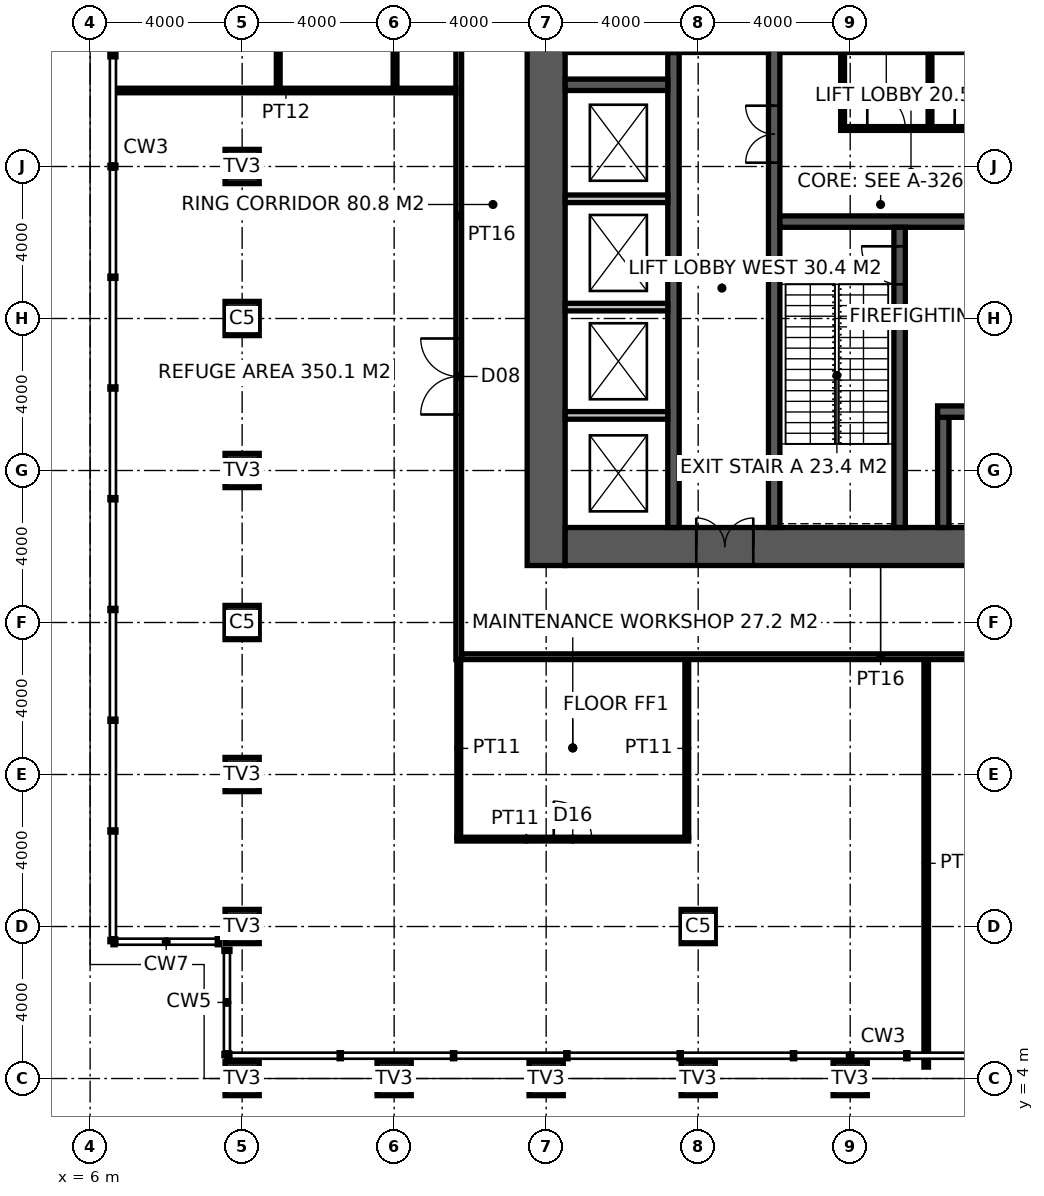
"""IFC4 building model, lengths in metres.
Left out: names, types, materials, properties, quantities, classifications, styles, units other than length and angle.
Written with IfcOpenShell. Run it as: python <this file> out.ifc"""

import sys

from ifc_helpers import new_model, si_unit, direction, frame, frame_2d, origin, origin_2d, place, context, subcontext, project, spatial, rectangle, hollow_rectangle, extrude, element, fill, save


model = new_model("IFC4")
c1 = context("Model", 3, precision=1e-05, world=origin(), true_north=direction((0.0, 1.0)))
c2 = subcontext(c1, "Body", "Model", "MODEL_VIEW")
j1 = project(units=[si_unit("LENGTHUNIT", "METRE"), si_unit("PLANEANGLEUNIT", "RADIAN")], contexts=[c1])
p1 = place(None, origin())
s1 = spatial("IfcSite", under=j1, at=p1, CompositionType="ELEMENT")
p2 = place(p1, origin())
s2 = spatial("IfcBuilding", under=s1, at=p2, CompositionType="ELEMENT")
p3 = place(p2, frame((0.0, 0.0, 137.4)))
s3 = spatial("IfcBuildingStorey", under=s2, at=p3, CompositionType="ELEMENT", Elevation=137.4)
for number, where, z_axis, x_axis in (
    (1, (10.0, 4.0, 0.0), (0.0, 0.0, 1.0), (1.0, 0.0, 0.0)),
    (2, (14.0, 4.0, 0.0), (0.0, 0.0, 1.0), (1.0, 0.0, 0.0)),
    (3, (18.0, 4.0, 0.0), (0.0, 0.0, 1.0), (1.0, 0.0, 0.0)),
    (4, (22.0, 4.0, 0.0), (0.0, 0.0, 1.0), (1.0, 0.0, 0.0)),
    (5, (26.0, 4.0, 0.0), (0.0, 0.0, 1.0), (1.0, 0.0, 0.0)),
    (6, (10.0, 8.0, 0.0), (0.0, 0.0, 1.0), (1.0, 0.0, 0.0)),
    (7, (10.0, 12.0, 0.0), (0.0, 0.0, 1.0), (1.0, 0.0, 0.0)),
    (8, (10.0, 20.0, 0.0), (0.0, 0.0, 1.0), (1.0, 0.0, 0.0)),
    (9, (10.0, 28.0, 0.0), (0.0, 0.0, 1.0), (1.0, 0.0, 0.0)),
):
    element("IfcColumn", number, at=place(p3, frame(where, z_axis=z_axis, x_axis=x_axis)), inside=s3, PredefinedType="USERDEFINED", context=c2, shape_type="SweptSolid", body=[
        extrude(hollow_rectangle(XDim=0.9, YDim=0.9, WallThickness=0.08, at=origin_2d()), origin(), (0.0, 0.0, 1.0), 5.4),
    ])
for number, where, z_axis, x_axis in (
    (10, (10.0, 16.0, 0.0), (0.0, 0.0, 1.0), (1.0, 0.0, 0.0)),
    (11, (10.0, 24.0, 0.0), (0.0, 0.0, 1.0), (1.0, 0.0, 0.0)),
    (12, (22.0, 8.0, 0.0), (0.0, 0.0, 1.0), (1.0, 0.0, 0.0)),
):
    element("IfcColumn", number, at=place(p3, frame(where, z_axis=z_axis, x_axis=x_axis)), inside=s3, PredefinedType="COLUMN", context=c2, shape_type="SweptSolid", body=[
        extrude(hollow_rectangle(XDim=0.9, YDim=0.9, WallThickness=0.1, at=origin_2d()), origin(), (0.0, 0.0, 1.0), 5.4),
    ])
p4 = place(p3, frame((18.0, 17.5, -0.15), z_axis=(0.0, 0.0, 1.0), x_axis=(0.0, 1.0, 0.0)))
e13 = element("IfcWall", 13, at=p4, inside=s3, PredefinedType="SHEAR", context=c2, shape_type="SweptSolid", body=[
    extrude(rectangle(XDim=19.0, YDim=1.0, at=frame_2d((9.5, 0.0))), origin(), (0.0, 0.0, 1.0), 5.4),
])
p5 = place(p3, frame((18.5, 18.0, -0.15), z_axis=(0.0, 0.0, 1.0), x_axis=(1.0, 0.0, 0.0)))
e14 = element("IfcWall", 14, at=p5, inside=s3, PredefinedType="SHEAR", context=c2, shape_type="SweptSolid", body=[
    extrude(rectangle(XDim=17.6, YDim=1.0, at=frame_2d((8.8, 0.0))), origin(), (0.0, 0.0, 1.0), 5.4),
])
p6 = place(p5, frame((3.45, 0.0, 0.15)))
e15 = element("IfcOpeningElement", 15, at=p6, cuts=e14, PredefinedType="OPENING", context=c2, shape_type="SweptSolid", body=[
    extrude(rectangle(XDim=1.5, YDim=2.4, at=frame_2d((0.75, 1.2))), frame((0.0, 0.51, 0.0), z_axis=(0.0, -1.0, 0.0), x_axis=(1.0, 0.0, 0.0)), (0.0, 0.0, 1.0), 1.02),
])
p7 = place(p3, frame((24.0, 18.5, -0.15), z_axis=(0.0, 0.0, 1.0), x_axis=(0.0, 1.0, 0.0)))
e16 = element("IfcWall", 16, at=p7, inside=s3, PredefinedType="SHEAR", context=c2, shape_type="SweptSolid", body=[
    extrude(rectangle(XDim=17.0, YDim=0.3, at=frame_2d((8.5, 0.0))), origin(), (0.0, 0.0, 1.0), 5.4),
])
p8 = place(p7, frame((9.6, 0.0, 0.15)))
e17 = element("IfcOpeningElement", 17, at=p8, cuts=e16, PredefinedType="OPENING", context=c2, shape_type="SweptSolid", body=[
    extrude(rectangle(XDim=1.5, YDim=2.4, at=frame_2d((0.75, 1.2))), frame((0.0, 0.16, 0.0), z_axis=(0.0, -1.0, 0.0), x_axis=(1.0, 0.0, 0.0)), (0.0, 0.0, 1.0), 0.32),
])
p9 = place(p3, frame((24.15, 26.55, -0.15), z_axis=(0.0, 0.0, 1.0), x_axis=(1.0, 0.0, 0.0)))
e18 = element("IfcWall", 18, at=p9, inside=s3, PredefinedType="SHEAR", context=c2, shape_type="SweptSolid", body=[
    extrude(rectangle(XDim=11.25, YDim=0.3, at=frame_2d((5.625, 0.0))), origin(), (0.0, 0.0, 1.0), 5.4),
])
p10 = place(p9, frame((9.25, 0.0, 0.15)))
e19 = element("IfcOpeningElement", 19, at=p10, cuts=e18, PredefinedType="OPENING", context=c2, shape_type="SweptSolid", body=[
    extrude(rectangle(XDim=1.0, YDim=2.2, at=frame_2d((0.5, 1.1))), frame((0.0, 0.16, 0.0), z_axis=(0.0, -1.0, 0.0), x_axis=(1.0, 0.0, 0.0)), (0.0, 0.0, 1.0), 0.32),
])
p11 = place(p9, frame((4.9, 0.0, 0.15)))
e20 = element("IfcOpeningElement", 20, at=p11, cuts=e18, PredefinedType="OPENING", context=c2, shape_type="SweptSolid", body=[
    extrude(rectangle(XDim=1.5, YDim=2.4, at=frame_2d((0.75, 1.2))), frame((0.0, 0.16, 0.0), z_axis=(0.0, -1.0, 0.0), x_axis=(1.0, 0.0, 0.0)), (0.0, 0.0, 1.0), 0.32),
])
p12 = place(p3, frame((27.3, 18.5, -0.15), z_axis=(0.0, 0.0, 1.0), x_axis=(0.0, 1.0, 0.0)))
e21 = element("IfcWall", 21, at=p12, inside=s3, PredefinedType="SHEAR", context=c2, shape_type="SweptSolid", body=[
    extrude(rectangle(XDim=7.9, YDim=0.3, at=frame_2d((3.95, 0.0))), origin(), (0.0, 0.0, 1.0), 5.4),
])
p13 = place(p12, frame((6.4, 0.0, 0.15)))
e22 = element("IfcOpeningElement", 22, at=p13, cuts=e21, PredefinedType="OPENING", context=c2, shape_type="SweptSolid", body=[
    extrude(rectangle(XDim=1.0, YDim=2.2, at=frame_2d((0.5, 1.1))), frame((0.0, 0.16, 0.0), z_axis=(0.0, -1.0, 0.0), x_axis=(1.0, 0.0, 0.0)), (0.0, 0.0, 1.0), 0.32),
])
p14 = place(p3, frame((28.45, 18.5, -0.15), z_axis=(0.0, 0.0, 1.0), x_axis=(0.0, 1.0, 0.0)))
e23 = element("IfcWall", 23, at=p14, inside=s3, PredefinedType="SHEAR", context=c2, shape_type="SweptSolid", body=[
    extrude(rectangle(XDim=2.9, YDim=0.3, at=frame_2d((1.45, 0.0))), origin(), (0.0, 0.0, 1.0), 5.4),
])
p15 = place(p3, frame((28.3, 21.55, -0.15), z_axis=(0.0, 0.0, 1.0), x_axis=(1.0, 0.0, 0.0)))
e24 = element("IfcWall", 24, at=p15, inside=s3, PredefinedType="SHEAR", context=c2, shape_type="SweptSolid", body=[
    extrude(rectangle(XDim=3.8, YDim=0.3, at=frame_2d((1.9, 0.0))), origin(), (0.0, 0.0, 1.0), 5.4),
])
p16 = place(p15, frame((1.05, 0.0, 0.15)))
e25 = element("IfcOpeningElement", 25, at=p16, cuts=e24, PredefinedType="OPENING", context=c2, shape_type="SweptSolid", body=[
    extrude(rectangle(XDim=1.3, YDim=2.4, at=frame_2d((0.65, 1.2))), frame((0.0, 0.16, 0.0), z_axis=(0.0, -1.0, 0.0), x_axis=(1.0, 0.0, 0.0)), (0.0, 0.0, 1.0), 0.32),
])
p17 = place(p3, frame((21.35, 18.5, -0.15), z_axis=(0.0, 0.0, 1.0), x_axis=(0.0, 1.0, 0.0)))
e26 = element("IfcWall", 26, at=p17, inside=s3, PredefinedType="SHEAR", context=c2, shape_type="SweptSolid", body=[
    extrude(rectangle(XDim=12.5, YDim=0.3, at=frame_2d((6.25, 0.0))), origin(), (0.0, 0.0, 1.0), 5.4),
])
p18 = place(p3, frame((18.5, 30.15, -0.15), z_axis=(0.0, 0.0, 1.0), x_axis=(1.0, 0.0, 0.0)))
e27 = element("IfcWall", 27, at=p18, inside=s3, PredefinedType="SHEAR", context=c2, shape_type="SweptSolid", body=[
    extrude(rectangle(XDim=2.7, YDim=0.3, at=frame_2d((1.35, 0.0))), origin(), (0.0, 0.0, 1.0), 5.4),
])
for number, where, z_axis, x_axis in (
    (28, (18.5, 21.45, 0.0), (0.0, 0.0, 1.0), (1.0, 0.0, 0.0)),
    (29, (18.5, 24.3, 0.0), (0.0, 0.0, 1.0), (1.0, 0.0, 0.0)),
    (30, (18.5, 27.15, 0.0), (0.0, 0.0, 1.0), (1.0, 0.0, 0.0)),
):
    element("IfcWall", number, at=place(p3, frame(where, z_axis=z_axis, x_axis=x_axis)), inside=s3, PredefinedType="SOLIDWALL", context=c2, shape_type="SweptSolid", body=[
        extrude(rectangle(XDim=2.7, YDim=0.2, at=frame_2d((1.35, 0.0))), origin(), (0.0, 0.0, 1.0), 5.25),
    ])
p19 = place(p3, frame((25.75, 29.0, 0.0), z_axis=(0.0, 0.0, 1.0), x_axis=(1.0, 0.0, 0.0)))
e31 = element("IfcWall", 31, at=p19, inside=s3, PredefinedType="PARTITIONING", context=c2, shape_type="SweptSolid", body=[
    extrude(rectangle(XDim=4.7, YDim=0.1, at=frame_2d((2.35, 0.0))), origin(), (0.0, 0.0, 1.0), 5.25),
])
p20 = place(p19, frame((0.7, 0.0, 0.0)))
e32 = element("IfcOpeningElement", 32, at=p20, cuts=e31, PredefinedType="OPENING", context=c2, shape_type="SweptSolid", body=[
    extrude(rectangle(XDim=1.0, YDim=2.2, at=frame_2d((0.5, 1.1))), frame((0.0, 0.06, 0.0), z_axis=(0.0, -1.0, 0.0), x_axis=(1.0, 0.0, 0.0)), (0.0, 0.0, 1.0), 0.12),
])
p21 = place(p19, frame((3.0, 0.0, 0.0)))
e33 = element("IfcOpeningElement", 33, at=p21, cuts=e31, PredefinedType="OPENING", context=c2, shape_type="SweptSolid", body=[
    extrude(rectangle(XDim=1.0, YDim=2.2, at=frame_2d((0.5, 1.1))), frame((0.0, 0.06, 0.0), z_axis=(0.0, -1.0, 0.0), x_axis=(1.0, 0.0, 0.0)), (0.0, 0.0, 1.0), 0.12),
])
for number, where, z_axis, x_axis in (
    (34, (25.8, 29.05, 0.0), (0.0, 0.0, 1.0), (0.0, 1.0, 0.0)),
    (35, (28.1, 29.05, 0.0), (0.0, 0.0, 1.0), (0.0, 1.0, 0.0)),
):
    element("IfcWall", number, at=place(p3, frame(where, z_axis=z_axis, x_axis=x_axis)), inside=s3, PredefinedType="PARTITIONING", context=c2, shape_type="SweptSolid", body=[
        extrude(rectangle(XDim=1.95, YDim=0.1, at=frame_2d((0.975, 0.0))), origin(), (0.0, 0.0, 1.0), 5.25),
    ])
p22 = place(p3, frame((15.7, 15.025, 0.0), z_axis=(0.0, 0.0, 1.0), x_axis=(0.0, 1.0, 0.0)))
e36 = element("IfcWall", 36, at=p22, inside=s3, PredefinedType="PARTITIONING", context=c2, shape_type="SweptSolid", body=[
    extrude(rectangle(XDim=23.35, YDim=0.15, at=frame_2d((11.675, 0.0))), origin(), (0.0, 0.0, 1.0), 5.25),
])
p23 = place(p22, frame((6.449, 0.0, 0.0)))
e37 = element("IfcOpeningElement", 37, at=p23, cuts=e36, PredefinedType="OPENING", context=c2, shape_type="SweptSolid", body=[
    extrude(rectangle(XDim=2.0, YDim=2.4, at=frame_2d((1.0, 1.2))), frame((0.0, 0.085, 0.0), z_axis=(0.0, -1.0, 0.0), x_axis=(1.0, 0.0, 0.0)), (0.0, 0.0, 1.0), 0.17),
])
p24 = place(p22, frame((17.601, 0.0, 0.0)))
e38 = element("IfcOpeningElement", 38, at=p24, cuts=e36, PredefinedType="OPENING", context=c2, shape_type="SweptSolid", body=[
    extrude(rectangle(XDim=3.0, YDim=3.3, at=frame_2d((1.5, 1.65))), frame((0.0, 0.085, 0.0), z_axis=(0.0, -1.0, 0.0), x_axis=(1.0, 0.0, 0.0)), (0.0, 0.0, 1.0), 0.17),
])
p25 = place(p3, frame((15.775, 15.1, 0.0), z_axis=(0.0, 0.0, 1.0), x_axis=(1.0, 0.0, 0.0)))
e39 = element("IfcWall", 39, at=p25, inside=s3, PredefinedType="PARTITIONING", context=c2, shape_type="SweptSolid", body=[
    extrude(rectangle(XDim=22.05, YDim=0.15, at=frame_2d((11.025, 0.0))), origin(), (0.0, 0.0, 1.0), 5.25),
])
p26 = place(p3, frame((28.0, 4.3, 0.0), z_axis=(0.0, 0.0, 1.0), x_axis=(0.0, 1.0, 0.0)))
e40 = element("IfcWall", 40, at=p26, inside=s3, PredefinedType="PARTITIONING", context=c2, shape_type="SweptSolid", body=[
    extrude(rectangle(XDim=10.725, YDim=0.12, at=frame_2d((5.362, 0.0))), origin(), (0.0, 0.0, 1.0), 5.25),
])
p27 = place(p3, frame((6.68, 30.0, 0.0), z_axis=(0.0, 0.0, 1.0), x_axis=(1.0, 0.0, 0.0)))
e41 = element("IfcWall", 41, at=p27, inside=s3, PredefinedType="PARTITIONING", context=c2, shape_type="SweptSolid", body=[
    extrude(rectangle(XDim=8.945, YDim=0.12, at=frame_2d((4.473, 0.0))), origin(), (0.0, 0.0, 1.0), 5.25),
])
p28 = place(p3, frame((15.65, 10.3, 0.0), z_axis=(0.0, 0.0, 1.0), x_axis=(1.0, 0.0, 0.0)))
e42 = element("IfcWall", 42, at=p28, inside=s3, PredefinedType="PARTITIONING", context=c2, shape_type="SweptSolid", body=[
    extrude(rectangle(XDim=6.1, YDim=0.1, at=frame_2d((3.05, 0.0))), origin(), (0.0, 0.0, 1.0), 5.25),
])
p29 = place(p28, frame((2.55, 0.0, 0.0)))
e43 = element("IfcOpeningElement", 43, at=p29, cuts=e42, PredefinedType="OPENING", context=c2, shape_type="SweptSolid", body=[
    extrude(rectangle(XDim=1.0, YDim=2.2, at=frame_2d((0.5, 1.1))), frame((0.0, 0.06, 0.0), z_axis=(0.0, -1.0, 0.0), x_axis=(1.0, 0.0, 0.0)), (0.0, 0.0, 1.0), 0.12),
])
for number, where, z_axis, x_axis in (
    (44, (15.7, 10.35, 0.0), (0.0, 0.0, 1.0), (0.0, 1.0, 0.0)),
    (45, (21.7, 10.35, 0.0), (0.0, 0.0, 1.0), (0.0, 1.0, 0.0)),
):
    element("IfcWall", number, at=place(p3, frame(where, z_axis=z_axis, x_axis=x_axis)), inside=s3, PredefinedType="PARTITIONING", context=c2, shape_type="SweptSolid", body=[
        extrude(rectangle(XDim=4.675, YDim=0.1, at=frame_2d((2.337, 0.0))), origin(), (0.0, 0.0, 1.0), 5.25),
    ])
p30 = place(p3, frame((10.95, 51.32, 0.0), z_axis=(0.0, 0.0, 1.0), x_axis=(0.0, -1.0, 0.0)))
e46 = element("IfcWall", 46, at=p30, inside=s3, PredefinedType="PARTITIONING", context=c2, shape_type="SweptSolid", body=[
    extrude(rectangle(XDim=21.319, YDim=0.1, at=frame_2d((10.66, 0.0))), origin(), (0.0, 0.0, 1.0), 5.25),
])
p31 = place(p30, frame((8.76, 0.0, 0.0)))
e47 = element("IfcOpeningElement", 47, at=p31, cuts=e46, PredefinedType="OPENING", context=c2, shape_type="SweptSolid", body=[
    extrude(rectangle(XDim=2.0, YDim=2.4, at=frame_2d((1.0, 1.2))), frame((0.0, 0.06, 0.0), z_axis=(0.0, -1.0, 0.0), x_axis=(1.0, 0.0, 0.0)), (0.0, 0.0, 1.0), 0.12),
])
p32 = place(p3, frame((14.024, 51.32, 0.0), z_axis=(0.0, 0.0, 1.0), x_axis=(0.0, -1.0, 0.0)))
e48 = element("IfcWall", 48, at=p32, inside=s3, PredefinedType="PARTITIONING", context=c2, shape_type="SweptSolid", body=[
    extrude(rectangle(XDim=21.319, YDim=0.1, at=frame_2d((10.66, 0.0))), origin(), (0.0, 0.0, 1.0), 4.35),
])
p33 = place(p32, frame((9.659, 0.0, 0.0)))
e49 = element("IfcOpeningElement", 49, at=p33, cuts=e48, PredefinedType="OPENING", context=c2, shape_type="SweptSolid", body=[
    extrude(rectangle(XDim=2.0, YDim=2.4, at=frame_2d((1.0, 1.2))), frame((0.0, 0.06, 0.0), z_axis=(0.0, -1.0, 0.0), x_axis=(1.0, 0.0, 0.0)), (0.0, 0.0, 1.0), 0.12),
])
p34 = place(p13, origin())
e50 = element("IfcDoor", 50, at=p34, inside=s3, OperationType="SINGLE_SWING_RIGHT", PredefinedType="DOOR", context=c2, shape_type="SweptSolid", body=[
    extrude(rectangle(XDim=1.0, YDim=2.2, at=frame_2d((0.5, 1.1))), frame((0.0, 0.025, 0.0), z_axis=(0.0, -1.0, 0.0), x_axis=(1.0, 0.0, 0.0)), (0.0, 0.0, 1.0), 0.05),
])
fill(e22, e50)
p35 = place(p8, origin())
e51 = element("IfcDoor", 51, at=p35, inside=s3, OperationType="DOUBLE_DOOR_DOUBLE_SWING", PredefinedType="DOOR", context=c2, shape_type="SweptSolid", body=[
    extrude(rectangle(XDim=1.5, YDim=2.4, at=frame_2d((0.75, 1.2))), frame((0.0, 0.025, 0.0), z_axis=(0.0, -1.0, 0.0), x_axis=(1.0, 0.0, 0.0)), (0.0, 0.0, 1.0), 0.05),
])
fill(e17, e51)
p36 = place(p20, origin())
e52 = element("IfcDoor", 52, at=p36, inside=s3, OperationType="SINGLE_SWING_LEFT", PredefinedType="DOOR", context=c2, shape_type="SweptSolid", body=[
    extrude(rectangle(XDim=1.0, YDim=2.2, at=frame_2d((0.5, 1.1))), frame((0.0, 0.025, 0.0), z_axis=(0.0, -1.0, 0.0), x_axis=(1.0, 0.0, 0.0)), (0.0, 0.0, 1.0), 0.05),
])
fill(e32, e52)
p37 = place(p21, origin())
e53 = element("IfcDoor", 53, at=p37, inside=s3, OperationType="SINGLE_SWING_LEFT", PredefinedType="DOOR", context=c2, shape_type="SweptSolid", body=[
    extrude(rectangle(XDim=1.0, YDim=2.2, at=frame_2d((0.5, 1.1))), frame((0.0, 0.025, 0.0), z_axis=(0.0, -1.0, 0.0), x_axis=(1.0, 0.0, 0.0)), (0.0, 0.0, 1.0), 0.05),
])
fill(e33, e53)
p38 = place(p6, origin())
e54 = element("IfcDoor", 54, at=p38, inside=s3, OperationType="DOUBLE_DOOR_DOUBLE_SWING", PredefinedType="DOOR", context=c2, shape_type="SweptSolid", body=[
    extrude(rectangle(XDim=1.5, YDim=2.4, at=frame_2d((0.75, 1.2))), frame((0.0, 0.025, 0.0), z_axis=(0.0, -1.0, 0.0), x_axis=(1.0, 0.0, 0.0)), (0.0, 0.0, 1.0), 0.05),
])
fill(e15, e54)
p39 = place(p23, origin())
e55 = element("IfcDoor", 55, at=p39, inside=s3, OperationType="DOUBLE_DOOR_DOUBLE_SWING", PredefinedType="DOOR", context=c2, shape_type="SweptSolid", body=[
    extrude(rectangle(XDim=2.0, YDim=2.4, at=frame_2d((1.0, 1.2))), frame((0.0, 0.025, 0.0), z_axis=(0.0, -1.0, 0.0), x_axis=(1.0, 0.0, 0.0)), (0.0, 0.0, 1.0), 0.05),
])
fill(e37, e55)
p40 = place(p29, origin())
e56 = element("IfcDoor", 56, at=p40, inside=s3, OperationType="SINGLE_SWING_LEFT", PredefinedType="DOOR", context=c2, shape_type="SweptSolid", body=[
    extrude(rectangle(XDim=1.0, YDim=2.2, at=frame_2d((0.5, 1.1))), frame((0.0, 0.025, 0.0), z_axis=(0.0, -1.0, 0.0), x_axis=(1.0, 0.0, 0.0)), (0.0, 0.0, 1.0), 0.05),
])
fill(e43, e56)
save(model, sys.argv[1])
